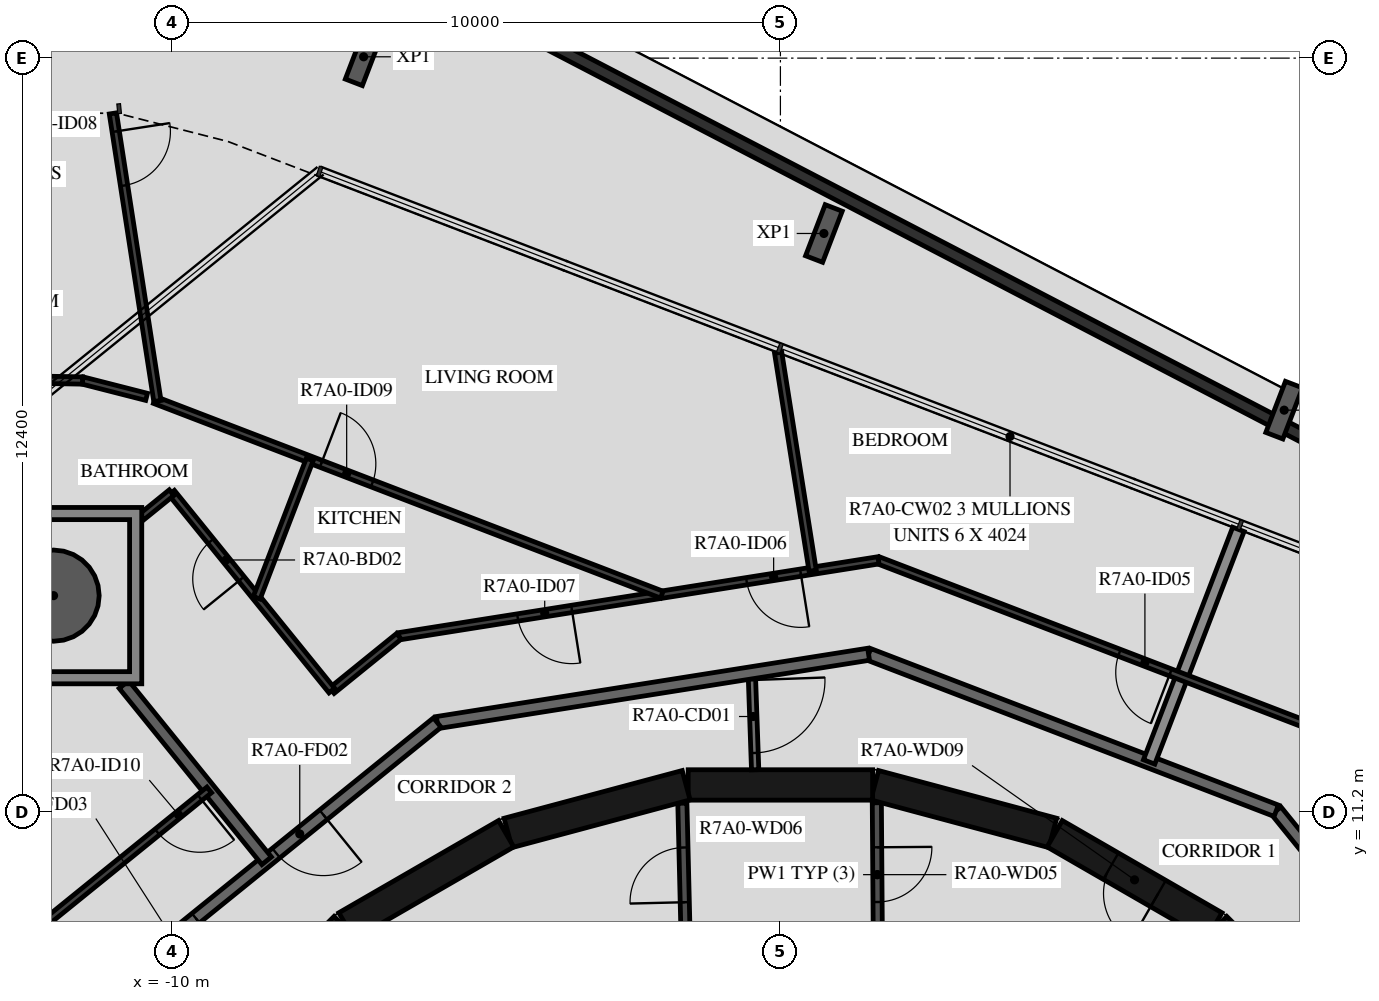
"""IFC4 building model, lengths in metres.
Left out: names, types, materials, properties, quantities, classifications, styles, units other than length and angle.
Written with IfcOpenShell. Run it as: python <this file> out.ifc"""

import sys

from ifc_helpers import new_model, si_unit, direction, frame, frame_2d, origin, origin_2d, place, context, subcontext, project, spatial, polyline, rectangle, hollow_circle, i_section, outline, extrude, element, fill, save


model = new_model("IFC4")
c1 = context("Model", 3, precision=1e-05, world=origin(), true_north=direction((0.0, 1.0)))
c2 = subcontext(c1, "Body", "Model", "MODEL_VIEW")
j1 = project(units=[si_unit("LENGTHUNIT", "METRE"), si_unit("PLANEANGLEUNIT", "RADIAN")], contexts=[c1])
p1 = place(None, origin())
s1 = spatial("IfcSite", under=j1, at=p1, CompositionType="ELEMENT")
p2 = place(p1, origin())
s2 = spatial("IfcBuilding", under=s1, at=p2, CompositionType="ELEMENT")
p3 = place(p2, frame((0.0, 0.0, 263.4)))
s3 = spatial("IfcBuildingStorey", under=s2, at=p3, CompositionType="ELEMENT", Elevation=263.4)
p4 = place(p3, frame((-11.953, 14.76, -0.45), z_axis=(0.0, 0.0, 1.0), x_axis=(1.0, 0.0, 0.0)))
e1 = element("IfcColumn", 1, at=p4, inside=s3, PredefinedType="COLUMN", context=c2, shape_type="SweptSolid", body=[
    extrude(hollow_circle(Radius=0.75, WallThickness=0.035, at=origin_2d()), origin(), (0.0, 0.0, 1.0), 3.57),
])
for number, where, z_axis, x_axis in (
    (2, (8.284, 17.811, -0.45), (0.0, 0.0, 1.0), (0.934, -0.358, 0.0)),
    (3, (0.715, 20.716, -0.45), (0.0, 0.0, 1.0), (0.934, -0.358, 0.0)),
    (4, (-6.854, 23.622, -0.45), (0.0, 0.0, 1.0), (0.934, -0.358, 0.0)),
):
    element("IfcColumn", number, at=place(p3, frame(where, z_axis=z_axis, x_axis=x_axis)), inside=s3, PredefinedType="COLUMN", context=c2, shape_type="SweptSolid", body=[
        extrude(i_section(OverallWidth=0.3, OverallDepth=0.9, WebThickness=0.019, FlangeThickness=0.035, FilletRadius=0.03, at=origin_2d()), origin(), (0.0, 0.0, 1.0), 3.57),
    ])
p5 = place(p3, frame((-6.133, 25.046, 0.03), z_axis=(0.0, 0.0, 1.0), x_axis=(0.887010202007, -0.461749825701, 0.0)))
e5 = element("IfcWall", 5, at=p5, inside=s3, PredefinedType="PARAPET", context=c2, shape_type="SweptSolid", body=[
    extrude(rectangle(XDim=34.009, YDim=0.2, at=frame_2d((17.004, 0.0))), origin(), (0.0, 0.0, 1.0), 1.5),
])
p6 = place(p3, frame((9.308, 7.164, 0.0), z_axis=(0.0, 0.0, 1.0), x_axis=(-0.707106781187, 0.707106781187, 0.0)))
e6 = element("IfcWall", 6, at=p6, inside=s3, PredefinedType="SHEAR", context=c2, shape_type="SweptSolid", body=[
    extrude(rectangle(XDim=3.032, YDim=0.5, at=frame_2d((1.516, 0.0))), origin(), (0.0, 0.0, 1.0), 3.12),
])
p7 = place(p6, frame((0.416, 0.0, 0.0)))
e7 = element("IfcOpeningElement", 7, at=p7, cuts=e6, PredefinedType="OPENING", context=c2, shape_type="SweptSolid", body=[
    extrude(rectangle(XDim=1.2, YDim=2.1, at=frame_2d((0.6, 1.05))), frame((0.0, 0.26, 0.0), z_axis=(0.0, -1.0, 0.0), x_axis=(1.0, 0.0, 0.0)), (0.0, 0.0, 1.0), 0.52),
])
p8 = place(p3, frame((7.137, 9.329, 0.0), z_axis=(0.0, 0.0, 1.0), x_axis=(-0.865975092491, 0.500087131594, 0.0)))
e8 = element("IfcWall", 8, at=p8, inside=s3, PredefinedType="SHEAR", context=c2, shape_type="SweptSolid", body=[
    extrude(rectangle(XDim=3.033, YDim=0.5, at=frame_2d((1.516, 0.0))), origin(), (0.0, 0.0, 1.0), 3.12),
])
p9 = place(p8, frame((1.066, 0.0, 0.0)))
e9 = element("IfcOpeningElement", 9, at=p9, cuts=e8, PredefinedType="OPENING", context=c2, shape_type="SweptSolid", body=[
    extrude(rectangle(XDim=0.9, YDim=2.1, at=frame_2d((0.45, 1.05))), frame((0.0, 0.26, 0.0), z_axis=(0.0, -1.0, 0.0), x_axis=(1.0, 0.0, 0.0)), (0.0, 0.0, 1.0), 0.52),
])
for number, where, z_axis, x_axis in (
    (10, (4.479, 10.858, 0.0), (0.0, 0.0, 1.0), (-0.966, 0.259, 0.0)),
    (11, (1.516, 11.647, 0.0), (0.0, 0.0, 1.0), (-1.0, 0.0, 0.0)),
    (12, (-1.55, 11.643, 0.0), (0.0, 0.0, 1.0), (-0.966, -0.259, 0.0)),
    (13, (-4.51, 10.845, 0.0), (0.0, 0.0, 1.0), (-0.866, -0.5, 0.0)),
):
    element("IfcWall", number, at=place(p3, frame(where, z_axis=z_axis, x_axis=x_axis)), inside=s3, PredefinedType="SHEAR", context=c2, shape_type="SweptSolid", body=[
        extrude(rectangle(XDim=3.033, YDim=0.5, at=frame_2d((1.516, 0.0))), origin(), (0.0, 0.0, 1.0), 3.12),
    ])
p10 = place(p3, frame((-7.164, 9.308, 0.0), z_axis=(0.0, 0.0, 1.0), x_axis=(-0.707106781187, -0.707106781187, 0.0)))
e14 = element("IfcWall", 14, at=p10, inside=s3, PredefinedType="SHEAR", context=c2, shape_type="SweptSolid", body=[
    extrude(rectangle(XDim=3.032, YDim=0.5, at=frame_2d((1.516, 0.0))), origin(), (0.0, 0.0, 1.0), 3.12),
])
p11 = place(p10, frame((1.416, 0.0, 0.0)))
e15 = element("IfcOpeningElement", 15, at=p11, cuts=e14, PredefinedType="OPENING", context=c2, shape_type="SweptSolid", body=[
    extrude(rectangle(XDim=1.2, YDim=2.1, at=frame_2d((0.6, 1.05))), frame((0.0, 0.26, 0.0), z_axis=(0.0, -1.0, 0.0), x_axis=(1.0, 0.0, 0.0)), (0.0, 0.0, 1.0), 0.52),
])
p12 = place(p3, frame((1.586, 11.354, 0.0), z_axis=(0.0, 0.0, 1.0), x_axis=(0.007227482881, -0.999973881405, 0.0)))
e16 = element("IfcWall", 16, at=p12, inside=s3, PredefinedType="PARTITIONING", context=c2, shape_type="SweptSolid", body=[
    extrude(rectangle(XDim=2.365, YDim=0.15, at=frame_2d((1.182, 0.0))), origin(), (0.0, 0.0, 1.0), 3.12),
])
p13 = place(p12, frame((0.732, 0.0, 0.0)))
e17 = element("IfcOpeningElement", 17, at=p13, cuts=e16, PredefinedType="OPENING", context=c2, shape_type="SweptSolid", body=[
    extrude(rectangle(XDim=0.9, YDim=2.1, at=frame_2d((0.45, 1.05))), frame((0.0, 0.085, 0.0), z_axis=(0.0, -1.0, 0.0), x_axis=(1.0, 0.0, 0.0)), (0.0, 0.0, 1.0), 0.17),
])
p14 = place(p3, frame((-1.555, 8.99, 0.0), z_axis=(0.0, 0.0, 1.0), x_axis=(-0.024125549686, 0.999708936567, 0.0)))
e18 = element("IfcWall", 18, at=p14, inside=s3, PredefinedType="PARTITIONING", context=c2, shape_type="SweptSolid", body=[
    extrude(rectangle(XDim=2.358, YDim=0.15, at=frame_2d((1.179, 0.0))), origin(), (0.0, 0.0, 1.0), 3.12),
])
p15 = place(p14, frame((0.729, 0.0, 0.0)))
e19 = element("IfcOpeningElement", 19, at=p15, cuts=e18, PredefinedType="OPENING", context=c2, shape_type="SweptSolid", body=[
    extrude(rectangle(XDim=0.9, YDim=2.1, at=frame_2d((0.45, 1.05))), frame((0.0, 0.085, 0.0), z_axis=(0.0, -1.0, 0.0), x_axis=(1.0, 0.0, 0.0)), (0.0, 0.0, 1.0), 0.17),
])
p16 = place(p3, frame((-0.471, 13.492, 0.0), z_axis=(0.0, 0.0, 1.0), x_axis=(0.034873173869, -0.999391745886, 0.0)))
e20 = element("IfcWall", 20, at=p16, inside=s3, PredefinedType="PARTITIONING", context=c2, shape_type="SweptSolid", body=[
    extrude(rectangle(XDim=1.596, YDim=0.12, at=frame_2d((0.798, 0.0))), origin(), (0.0, 0.0, 1.0), 3.12),
])
p17 = place(p16, frame((0.12, 0.0, 0.0)))
e21 = element("IfcOpeningElement", 21, at=p17, cuts=e20, PredefinedType="OPENING", context=c2, shape_type="SweptSolid", body=[
    extrude(rectangle(XDim=1.2, YDim=2.1, at=frame_2d((0.6, 1.05))), frame((0.0, 0.07, 0.0), z_axis=(0.0, -1.0, 0.0), x_axis=(1.0, 0.0, 0.0)), (0.0, 0.0, 1.0), 0.14),
])
p18 = place(p3, frame((12.673, 5.643, 0.0), z_axis=(0.0, 0.0, 1.0), x_axis=(-0.629302871585, 0.777160148113, 0.0)))
e22 = element("IfcWall", 22, at=p18, inside=s3, PredefinedType="STANDARD", context=c2, shape_type="SweptSolid", body=[
    extrude(rectangle(XDim=7.181, YDim=0.2, at=frame_2d((3.59, 0.0))), origin(), (0.0, 0.0, 1.0), 3.12),
])
p19 = place(p18, frame((4.1, 0.0, 0.0)))
e23 = element("IfcOpeningElement", 23, at=p19, cuts=e22, PredefinedType="OPENING", context=c2, shape_type="SweptSolid", body=[
    extrude(rectangle(XDim=1.0, YDim=2.1, at=frame_2d((0.5, 1.05))), frame((0.0, 0.11, 0.0), z_axis=(0.0, -1.0, 0.0), x_axis=(1.0, 0.0, 0.0)), (0.0, 0.0, 1.0), 0.22),
])
p20 = place(p3, frame((8.154, 11.223, 0.0), z_axis=(0.0, 0.0, 1.0), x_axis=(-0.93359073609, 0.358341090983, 0.0)))
e24 = element("IfcWall", 24, at=p20, inside=s3, PredefinedType="STANDARD", context=c2, shape_type="SweptSolid", body=[
    extrude(rectangle(XDim=7.181, YDim=0.2, at=frame_2d((3.59, 0.0))), origin(), (0.0, 0.0, 1.0), 3.12),
])
p21 = place(p3, frame((1.45, 13.797, 0.0), z_axis=(0.0, 0.0, 1.0), x_axis=(-0.987690361611, -0.156421704315, 0.0)))
e25 = element("IfcWall", 25, at=p21, inside=s3, PredefinedType="STANDARD", context=c2, shape_type="SweptSolid", body=[
    extrude(rectangle(XDim=7.181, YDim=0.2, at=frame_2d((3.591, 0.0))), origin(), (0.0, 0.0, 1.0), 3.12),
])
p22 = place(p3, frame((-5.643, 12.673, 0.0), z_axis=(0.0, 0.0, 1.0), x_axis=(-0.777160148113, -0.629302871585, 0.0)))
e26 = element("IfcWall", 26, at=p22, inside=s3, PredefinedType="STANDARD", context=c2, shape_type="SweptSolid", body=[
    extrude(rectangle(XDim=7.181, YDim=0.2, at=frame_2d((3.59, 0.0))), origin(), (0.0, 0.0, 1.0), 3.12),
])
p23 = place(p22, frame((2.41, 0.0, 0.0)))
e27 = element("IfcOpeningElement", 27, at=p23, cuts=e26, PredefinedType="OPENING", context=c2, shape_type="SweptSolid", body=[
    extrude(rectangle(XDim=1.0, YDim=2.1, at=frame_2d((0.5, 1.05))), frame((0.0, 0.11, 0.0), z_axis=(0.0, -1.0, 0.0), x_axis=(1.0, 0.0, 0.0)), (0.0, 0.0, 1.0), 0.22),
])
p24 = place(p22, frame((5.112, 0.0, 0.0)))
e28 = element("IfcOpeningElement", 28, at=p24, cuts=e26, PredefinedType="OPENING", context=c2, shape_type="SweptSolid", body=[
    extrude(rectangle(XDim=1.0, YDim=2.1, at=frame_2d((0.5, 1.05))), frame((0.0, 0.11, 0.0), z_axis=(0.0, -1.0, 0.0), x_axis=(1.0, 0.0, 0.0)), (0.0, 0.0, 1.0), 0.22),
])
p25 = place(p3, frame((7.532, 15.85, 0.0), z_axis=(0.0, 0.0, 1.0), x_axis=(-0.358355996975, -0.933585014571, 0.0)))
e29 = element("IfcWall", 29, at=p25, inside=s3, PredefinedType="STANDARD", context=c2, shape_type="SweptSolid", body=[
    extrude(rectangle(XDim=4.096, YDim=0.2, at=frame_2d((2.048, 0.0))), origin(), (0.0, 0.0, 1.0), 2.73),
])
p26 = place(p3, frame((-10.796, 13.299, 0.0), z_axis=(0.0, 0.0, 1.0), x_axis=(0.629290499381, -0.777170166301, 0.0)))
e30 = element("IfcWall", 30, at=p26, inside=s3, PredefinedType="STANDARD", context=c2, shape_type="SweptSolid", body=[
    extrude(rectangle(XDim=3.729, YDim=0.2, at=frame_2d((1.865, 0.0))), origin(), (0.0, 0.0, 1.0), 3.12),
])
p27 = place(p3, frame((9.067, 12.479, 0.0), z_axis=(0.0, 0.0, 1.0), x_axis=(-0.933579449035, 0.358370495911, 0.0)))
e31 = element("IfcWall", 31, at=p27, inside=s3, PredefinedType="PARTITIONING", context=c2, shape_type="SweptSolid", body=[
    extrude(rectangle(XDim=7.985, YDim=0.12, at=frame_2d((3.992, 0.0))), origin(), (0.0, 0.0, 1.0), 3.12),
])
p28 = place(p27, frame((2.841, 0.0, 0.0)))
e32 = element("IfcOpeningElement", 32, at=p28, cuts=e31, PredefinedType="OPENING", context=c2, shape_type="SweptSolid", body=[
    extrude(rectangle(XDim=0.9, YDim=2.1, at=frame_2d((0.45, 1.05))), frame((0.0, 0.07, 0.0), z_axis=(0.0, -1.0, 0.0), x_axis=(1.0, 0.0, 0.0)), (0.0, 0.0, 1.0), 0.14),
])
p29 = place(p3, frame((1.612, 15.341, 0.0), z_axis=(0.0, 0.0, 1.0), x_axis=(-0.987689722749, -0.156425738216, 0.0)))
e33 = element("IfcWall", 33, at=p29, inside=s3, PredefinedType="PARTITIONING", context=c2, shape_type="SweptSolid", body=[
    extrude(rectangle(XDim=7.985, YDim=0.12, at=frame_2d((3.992, 0.0))), origin(), (0.0, 0.0, 1.0), 3.12),
])
p30 = place(p29, frame((1.295, 0.0, 0.0)))
e34 = element("IfcOpeningElement", 34, at=p30, cuts=e33, PredefinedType="OPENING", context=c2, shape_type="SweptSolid", body=[
    extrude(rectangle(XDim=0.9, YDim=2.1, at=frame_2d((0.45, 1.05))), frame((0.0, 0.07, 0.0), z_axis=(0.0, -1.0, 0.0), x_axis=(1.0, 0.0, 0.0)), (0.0, 0.0, 1.0), 0.14),
])
p31 = place(p29, frame((5.107, 0.0, 0.0)))
e35 = element("IfcOpeningElement", 35, at=p31, cuts=e33, PredefinedType="OPENING", context=c2, shape_type="SweptSolid", body=[
    extrude(rectangle(XDim=0.9, YDim=2.1, at=frame_2d((0.45, 1.05))), frame((0.0, 0.07, 0.0), z_axis=(0.0, -1.0, 0.0), x_axis=(1.0, 0.0, 0.0)), (0.0, 0.0, 1.0), 0.14),
])
p32 = place(p3, frame((-6.274, 14.092, 0.0), z_axis=(0.0, 0.0, 1.0), x_axis=(-0.777144673245, -0.629321981855, 0.0)))
e36 = element("IfcWall", 36, at=p32, inside=s3, PredefinedType="PARTITIONING", context=c2, shape_type="SweptSolid", body=[
    extrude(rectangle(XDim=1.419, YDim=0.12, at=frame_2d((0.709, 0.0))), origin(), (0.0, 0.0, 1.0), 3.12),
])
p33 = place(p3, frame((-7.377, 13.199, 0.0), z_axis=(0.0, 0.0, 1.0), x_axis=(-0.629382670352, 0.77709552454, 0.0)))
e37 = element("IfcWall", 37, at=p33, inside=s3, PredefinedType="PARTITIONING", context=c2, shape_type="SweptSolid", body=[
    extrude(rectangle(XDim=4.188, YDim=0.12, at=frame_2d((2.094, 0.0))), origin(), (0.0, 0.0, 1.0), 3.12),
])
p34 = place(p33, frame((2.364, 0.0, 0.0)))
e38 = element("IfcOpeningElement", 38, at=p34, cuts=e37, PredefinedType="OPENING", context=c2, shape_type="SweptSolid", body=[
    extrude(rectangle(XDim=0.8, YDim=2.1, at=frame_2d((0.4, 1.05))), frame((0.0, 0.07, 0.0), z_axis=(0.0, -1.0, 0.0), x_axis=(1.0, 0.0, 0.0)), (0.0, 0.0, 1.0), 0.14),
])
p35 = place(p3, frame((-10.013, 16.454, 0.0), z_axis=(0.0, 0.0, 1.0), x_axis=(-0.777001388062, -0.629498882406, 0.0)))
e39 = element("IfcWall", 39, at=p35, inside=s3, PredefinedType="PARTITIONING", context=c2, shape_type="SweptSolid", body=[
    extrude(rectangle(XDim=0.631, YDim=0.12, at=frame_2d((0.315, 0.0))), origin(), (0.0, 0.0, 1.0), 3.12),
])
p36 = place(p3, frame((-0.037, 18.756, 0.0), z_axis=(0.0, 0.0, 1.0), x_axis=(0.156421851095, -0.987690338365, 0.0)))
e40 = element("IfcWall", 40, at=p36, inside=s3, PredefinedType="PARTITIONING", context=c2, shape_type="SweptSolid", body=[
    extrude(rectangle(XDim=3.63, YDim=0.12, at=frame_2d((1.815, 0.0))), origin(), (0.0, 0.0, 1.0), 3.12),
])
p37 = place(p3, frame((-10.289, 17.978, 0.0), z_axis=(0.0, 0.0, 1.0), x_axis=(0.933579293595, -0.358370900844, 0.0)))
e41 = element("IfcWall", 41, at=p37, inside=s3, PredefinedType="PARTITIONING", context=c2, shape_type="SweptSolid", body=[
    extrude(rectangle(XDim=8.932, YDim=0.12, at=frame_2d((4.466, 0.0))), origin(), (0.0, 0.0, 1.0), 3.12),
])
p38 = place(p37, frame((2.93, 0.0, 0.0)))
e42 = element("IfcOpeningElement", 42, at=p38, cuts=e41, PredefinedType="OPENING", context=c2, shape_type="SweptSolid", body=[
    extrude(rectangle(XDim=0.9, YDim=2.1, at=frame_2d((0.45, 1.05))), frame((0.0, 0.07, 0.0), z_axis=(0.0, -1.0, 0.0), x_axis=(1.0, 0.0, 0.0)), (0.0, 0.0, 1.0), 0.14),
])
p39 = place(p3, frame((-10.977, 22.691, 0.0), z_axis=(0.0, 0.0, 1.0), x_axis=(0.152888983102, -0.988243370252, 0.0)))
e43 = element("IfcWall", 43, at=p39, inside=s3, PredefinedType="PARTITIONING", context=c2, shape_type="SweptSolid", body=[
    extrude(rectangle(XDim=4.786, YDim=0.12, at=frame_2d((2.393, 0.0))), origin(), (0.0, 0.0, 1.0), 3.12),
])
p40 = place(p39, frame((0.3, 0.0, 0.0)))
e44 = element("IfcOpeningElement", 44, at=p40, cuts=e43, PredefinedType="OPENING", context=c2, shape_type="SweptSolid", body=[
    extrude(rectangle(XDim=0.9, YDim=2.1, at=frame_2d((0.45, 1.05))), frame((0.0, 0.07, 0.0), z_axis=(0.0, -1.0, 0.0), x_axis=(1.0, 0.0, 0.0)), (0.0, 0.0, 1.0), 0.14),
])
p41 = place(p3, frame((-7.74, 17.0, 0.0), z_axis=(0.0, 0.0, 1.0), x_axis=(-0.358394723652, -0.93357014844, 0.0)))
e45 = element("IfcWall", 45, at=p41, inside=s3, PredefinedType="PARTITIONING", context=c2, shape_type="SweptSolid", body=[
    extrude(rectangle(XDim=2.436, YDim=0.12, at=frame_2d((1.218, 0.0))), origin(), (0.0, 0.0, 1.0), 3.12),
])
p42 = place(p3, frame((-10.424, 18.03, 0.0), z_axis=(0.0, 0.0, 1.0), x_axis=(-0.968874161395, 0.247553750489, 0.0)))
e46 = element("IfcWall", 46, at=p42, inside=s3, PredefinedType="PARTITIONING", context=c2, shape_type="SweptSolid", body=[
    extrude(rectangle(XDim=1.087, YDim=0.12, at=frame_2d((0.543, 0.0))), origin(), (0.0, 0.0, 1.0), 3.12),
])
p43 = place(p3, frame((-11.477, 18.299, 0.0), z_axis=(0.0, 0.0, 1.0), x_axis=(-0.999848939146, 0.017380992165, 0.0)))
e47 = element("IfcWall", 47, at=p43, inside=s3, PredefinedType="PARTITIONING", context=c2, shape_type="SweptSolid", body=[
    extrude(rectangle(XDim=0.829, YDim=0.12, at=frame_2d((0.415, 0.0))), origin(), (0.0, 0.0, 1.0), 3.12),
])
p44 = place(p3, frame((-9.393, 11.566, 0.0), z_axis=(0.0, 0.0, 1.0), x_axis=(-0.777100258587, -0.629376825205, 0.0)))
e48 = element("IfcWall", 48, at=p44, inside=s3, PredefinedType="PARTITIONING", context=c2, shape_type="SweptSolid", body=[
    extrude(rectangle(XDim=3.971, YDim=0.12, at=frame_2d((1.986, 0.0))), origin(), (0.0, 0.0, 1.0), 3.12),
])
p45 = place(p44, frame((0.2, 0.0, 0.0)))
e49 = element("IfcOpeningElement", 49, at=p45, cuts=e48, PredefinedType="OPENING", context=c2, shape_type="SweptSolid", body=[
    extrude(rectangle(XDim=0.9, YDim=2.1, at=frame_2d((0.45, 1.05))), frame((0.0, 0.07, 0.0), z_axis=(0.0, -1.0, 0.0), x_axis=(1.0, 0.0, 0.0)), (0.0, 0.0, 1.0), 0.14),
])
p46 = place(p3, origin())
e50 = element("IfcWall", 50, at=p46, inside=s3, PredefinedType="STANDARD", context=c2, shape_type="SweptSolid", body=[
    extrude(outline(polyline([(-10.503, 16.21), (-10.503, 13.311), (-13.403, 13.311), (-13.403, 16.21), (-10.503, 16.21)]), holes=[polyline([(-13.203, 13.51), (-10.703, 13.51), (-10.703, 16.01), (-13.203, 16.01), (-13.203, 13.51)])]), origin(), (0.0, 0.0, 1.0), 3.12),
])
p47 = place(p13, origin())
e51 = element("IfcDoor", 51, at=p47, inside=s3, OperationType="SINGLE_SWING_LEFT", PredefinedType="DOOR", context=c2, shape_type="SweptSolid", body=[
    extrude(rectangle(XDim=0.9, YDim=2.1, at=frame_2d((0.45, 1.05))), frame((0.0, 0.025, 0.0), z_axis=(0.0, -1.0, 0.0), x_axis=(1.0, 0.0, 0.0)), (0.0, 0.0, 1.0), 0.05),
])
fill(e17, e51)
p48 = place(p15, origin())
e52 = element("IfcDoor", 52, at=p48, inside=s3, OperationType="SINGLE_SWING_RIGHT", PredefinedType="DOOR", context=c2, shape_type="SweptSolid", body=[
    extrude(rectangle(XDim=0.9, YDim=2.1, at=frame_2d((0.45, 1.05))), frame((0.0, 0.025, 0.0), z_axis=(0.0, -1.0, 0.0), x_axis=(1.0, 0.0, 0.0)), (0.0, 0.0, 1.0), 0.05),
])
fill(e19, e52)
p49 = place(p9, origin())
e53 = element("IfcDoor", 53, at=p49, inside=s3, OperationType="SINGLE_SWING_LEFT", PredefinedType="DOOR", context=c2, shape_type="SweptSolid", body=[
    extrude(rectangle(XDim=0.9, YDim=2.1, at=frame_2d((0.45, 1.05))), frame((0.0, 0.025, 0.0), z_axis=(0.0, -1.0, 0.0), x_axis=(1.0, 0.0, 0.0)), (0.0, 0.0, 1.0), 0.05),
])
fill(e9, e53)
p50 = place(p23, origin())
e54 = element("IfcDoor", 54, at=p50, inside=s3, OperationType="SINGLE_SWING_RIGHT", PredefinedType="DOOR", context=c2, shape_type="SweptSolid", body=[
    extrude(rectangle(XDim=1.0, YDim=2.1, at=frame_2d((0.5, 1.05))), frame((0.0, 0.025, 0.0), z_axis=(0.0, -1.0, 0.0), x_axis=(1.0, 0.0, 0.0)), (0.0, 0.0, 1.0), 0.05),
])
fill(e27, e54)
p51 = place(p28, origin())
e55 = element("IfcDoor", 55, at=p51, inside=s3, OperationType="SINGLE_SWING_LEFT", PredefinedType="DOOR", context=c2, shape_type="SweptSolid", body=[
    extrude(rectangle(XDim=0.9, YDim=2.1, at=frame_2d((0.45, 1.05))), frame((0.0, 0.025, 0.0), z_axis=(0.0, -1.0, 0.0), x_axis=(1.0, 0.0, 0.0)), (0.0, 0.0, 1.0), 0.05),
])
fill(e32, e55)
p52 = place(p30, origin())
e56 = element("IfcDoor", 56, at=p52, inside=s3, OperationType="SINGLE_SWING_RIGHT", PredefinedType="DOOR", context=c2, shape_type="SweptSolid", body=[
    extrude(rectangle(XDim=0.9, YDim=2.1, at=frame_2d((0.45, 1.05))), frame((0.0, 0.025, 0.0), z_axis=(0.0, -1.0, 0.0), x_axis=(1.0, 0.0, 0.0)), (0.0, 0.0, 1.0), 0.05),
])
fill(e34, e56)
p53 = place(p31, origin())
e57 = element("IfcDoor", 57, at=p53, inside=s3, OperationType="SINGLE_SWING_RIGHT", PredefinedType="DOOR", context=c2, shape_type="SweptSolid", body=[
    extrude(rectangle(XDim=0.9, YDim=2.1, at=frame_2d((0.45, 1.05))), frame((0.0, 0.025, 0.0), z_axis=(0.0, -1.0, 0.0), x_axis=(1.0, 0.0, 0.0)), (0.0, 0.0, 1.0), 0.05),
])
fill(e35, e57)
p54 = place(p34, origin())
e58 = element("IfcDoor", 58, at=p54, inside=s3, OperationType="SINGLE_SWING_RIGHT", PredefinedType="DOOR", context=c2, shape_type="SweptSolid", body=[
    extrude(rectangle(XDim=0.8, YDim=2.1, at=frame_2d((0.4, 1.05))), frame((0.0, 0.025, 0.0), z_axis=(0.0, -1.0, 0.0), x_axis=(1.0, 0.0, 0.0)), (0.0, 0.0, 1.0), 0.05),
])
fill(e38, e58)
p55 = place(p40, origin())
e59 = element("IfcDoor", 59, at=p55, inside=s3, OperationType="SINGLE_SWING_RIGHT", PredefinedType="DOOR", context=c2, shape_type="SweptSolid", body=[
    extrude(rectangle(XDim=0.9, YDim=2.1, at=frame_2d((0.45, 1.05))), frame((0.0, 0.025, 0.0), z_axis=(0.0, -1.0, 0.0), x_axis=(1.0, 0.0, 0.0)), (0.0, 0.0, 1.0), 0.05),
])
fill(e44, e59)
p56 = place(p38, origin())
e60 = element("IfcDoor", 60, at=p56, inside=s3, OperationType="SINGLE_SWING_LEFT", PredefinedType="DOOR", context=c2, shape_type="SweptSolid", body=[
    extrude(rectangle(XDim=0.9, YDim=2.1, at=frame_2d((0.45, 1.05))), frame((0.0, 0.025, 0.0), z_axis=(0.0, -1.0, 0.0), x_axis=(1.0, 0.0, 0.0)), (0.0, 0.0, 1.0), 0.05),
])
fill(e42, e60)
p57 = place(p24, origin())
e61 = element("IfcDoor", 61, at=p57, inside=s3, OperationType="SINGLE_SWING_LEFT", PredefinedType="DOOR", context=c2, shape_type="SweptSolid", body=[
    extrude(rectangle(XDim=1.0, YDim=2.1, at=frame_2d((0.5, 1.05))), frame((0.0, 0.025, 0.0), z_axis=(0.0, -1.0, 0.0), x_axis=(1.0, 0.0, 0.0)), (0.0, 0.0, 1.0), 0.05),
])
fill(e28, e61)
p58 = place(p45, origin())
e62 = element("IfcDoor", 62, at=p58, inside=s3, OperationType="SINGLE_SWING_LEFT", PredefinedType="DOOR", context=c2, shape_type="SweptSolid", body=[
    extrude(rectangle(XDim=0.9, YDim=2.1, at=frame_2d((0.45, 1.05))), frame((0.0, 0.025, 0.0), z_axis=(0.0, -1.0, 0.0), x_axis=(1.0, 0.0, 0.0)), (0.0, 0.0, 1.0), 0.05),
])
fill(e49, e62)
p59 = place(p17, origin())
e63 = element("IfcDoor", 63, at=p59, inside=s3, OperationType="DOUBLE_DOOR_SINGLE_SWING", PredefinedType="DOOR", context=c2, shape_type="SweptSolid", body=[
    extrude(rectangle(XDim=1.2, YDim=2.1, at=frame_2d((0.6, 1.05))), frame((0.0, 0.025, 0.0), z_axis=(0.0, -1.0, 0.0), x_axis=(1.0, 0.0, 0.0)), (0.0, 0.0, 1.0), 0.05),
])
fill(e21, e63)
save(model, sys.argv[1])
